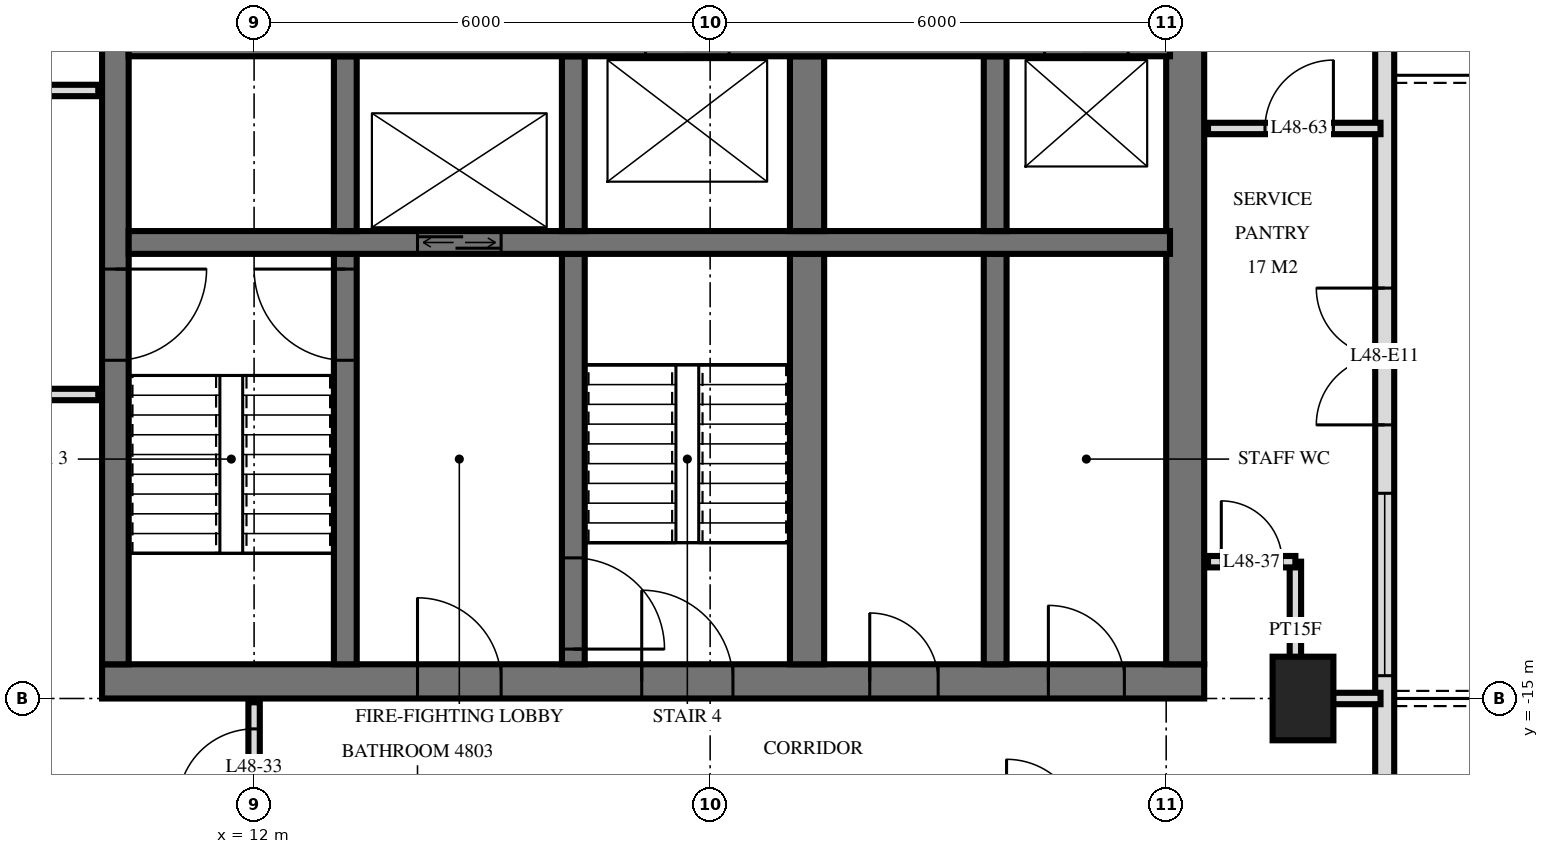
"""IFC4 building model, lengths in metres.
Left out: names, types, materials, properties, quantities, classifications, styles, units other than length and angle.
Written with IfcOpenShell. Run it as: python <this file> out.ifc"""

import sys

from ifc_helpers import new_model, si_unit, direction, frame, frame_2d, origin, origin_2d, place, context, subcontext, project, spatial, rectangle, extrude, element, fill, save


model = new_model("IFC4")
c1 = context("Model", 3, precision=1e-05, world=origin(), true_north=direction((0.0, 1.0)))
c2 = subcontext(c1, "Body", "Model", "MODEL_VIEW")
j1 = project(units=[si_unit("LENGTHUNIT", "METRE"), si_unit("PLANEANGLEUNIT", "RADIAN")], contexts=[c1])
p1 = place(None, origin())
s1 = spatial("IfcSite", under=j1, at=p1, CompositionType="ELEMENT")
p2 = place(p1, origin())
s2 = spatial("IfcBuilding", under=s1, at=p2, CompositionType="ELEMENT")
p3 = place(p2, frame((0.0, 0.0, 187.1)))
s3 = spatial("IfcBuildingStorey", under=s2, at=p3, CompositionType="ELEMENT", Elevation=187.1)
p4 = place(p3, frame((25.8, -15.0, 0.0), z_axis=(0.0, 0.0, 1.0), x_axis=(0.0, 1.0, 0.0)))
e1 = element("IfcColumn", 1, at=p4, inside=s3, PredefinedType="COLUMN", context=c2, shape_type="SweptSolid", body=[
    extrude(rectangle(XDim=1.1, YDim=0.8, at=origin_2d()), origin(), (0.0, 0.0, 1.0), 3.5),
])
p5 = place(p3, frame((10.0, -14.775, 0.0), z_axis=(0.0, 0.0, 1.0), x_axis=(1.0, 0.0, 0.0)))
e2 = element("IfcWall", 2, at=p5, inside=s3, PredefinedType="SHEAR", context=c2, shape_type="SweptSolid", body=[
    extrude(rectangle(XDim=14.5, YDim=0.45, at=frame_2d((7.25, 0.0))), origin(), (0.0, 0.0, 1.0), 3.5),
])
p6 = place(p5, frame((7.1, 0.0, 0.0)))
e3 = element("IfcOpeningElement", 3, at=p6, cuts=e2, PredefinedType="OPENING", context=c2, shape_type="SweptSolid", body=[
    extrude(rectangle(XDim=1.2, YDim=2.1, at=frame_2d((0.6, 1.05))), frame((0.0, 0.235, 0.0), z_axis=(0.0, -1.0, 0.0), x_axis=(1.0, 0.0, 0.0)), (0.0, 0.0, 1.0), 0.47),
])
p7 = place(p5, frame((4.15, 0.0, 0.0)))
e4 = element("IfcOpeningElement", 4, at=p7, cuts=e2, PredefinedType="OPENING", context=c2, shape_type="SweptSolid", body=[
    extrude(rectangle(XDim=1.1, YDim=2.1, at=frame_2d((0.55, 1.05))), frame((0.0, 0.235, 0.0), z_axis=(0.0, -1.0, 0.0), x_axis=(1.0, 0.0, 0.0)), (0.0, 0.0, 1.0), 0.47),
])
p8 = place(p5, frame((10.1, 0.0, 0.0)))
e5 = element("IfcOpeningElement", 5, at=p8, cuts=e2, PredefinedType="OPENING", context=c2, shape_type="SweptSolid", body=[
    extrude(rectangle(XDim=0.9, YDim=2.1, at=frame_2d((0.45, 1.05))), frame((0.0, 0.235, 0.0), z_axis=(0.0, -1.0, 0.0), x_axis=(1.0, 0.0, 0.0)), (0.0, 0.0, 1.0), 0.47),
])
p9 = place(p5, frame((12.45, 0.0, 0.0)))
e6 = element("IfcOpeningElement", 6, at=p9, cuts=e2, PredefinedType="OPENING", context=c2, shape_type="SweptSolid", body=[
    extrude(rectangle(XDim=1.0, YDim=2.1, at=frame_2d((0.5, 1.05))), frame((0.0, 0.235, 0.0), z_axis=(0.0, -1.0, 0.0), x_axis=(1.0, 0.0, 0.0)), (0.0, 0.0, 1.0), 0.47),
])
p10 = place(p3, frame((10.175, -14.55, 0.0), z_axis=(0.0, 0.0, 1.0), x_axis=(0.0, 1.0, 0.0)))
e7 = element("IfcWall", 7, at=p10, inside=s3, PredefinedType="SHEAR", context=c2, shape_type="SweptSolid", body=[
    extrude(rectangle(XDim=14.1, YDim=0.35, at=frame_2d((7.05, 0.0))), origin(), (0.0, 0.0, 1.0), 3.5),
])
p11 = place(p10, frame((8.4, 0.0, 0.0)))
e8 = element("IfcOpeningElement", 8, at=p11, cuts=e7, PredefinedType="OPENING", context=c2, shape_type="SweptSolid", body=[
    extrude(rectangle(XDim=1.4, YDim=2.4, at=frame_2d((0.7, 1.2))), frame((0.0, 0.185, 0.0), z_axis=(0.0, -1.0, 0.0), x_axis=(1.0, 0.0, 0.0)), (0.0, 0.0, 1.0), 0.37),
])
p12 = place(p10, frame((10.0, 0.0, 0.0)))
e9 = element("IfcOpeningElement", 9, at=p12, cuts=e7, PredefinedType="OPENING", context=c2, shape_type="SweptSolid", body=[
    extrude(rectangle(XDim=1.4, YDim=2.4, at=frame_2d((0.7, 1.2))), frame((0.0, 0.185, 0.0), z_axis=(0.0, -1.0, 0.0), x_axis=(1.0, 0.0, 0.0)), (0.0, 0.0, 1.0), 0.37),
])
p13 = place(p10, frame((4.0, 0.0, 0.0)))
e10 = element("IfcOpeningElement", 10, at=p13, cuts=e7, PredefinedType="OPENING", context=c2, shape_type="SweptSolid", body=[
    extrude(rectangle(XDim=1.2, YDim=2.1, at=frame_2d((0.6, 1.05))), frame((0.0, 0.185, 0.0), z_axis=(0.0, -1.0, 0.0), x_axis=(1.0, 0.0, 0.0)), (0.0, 0.0, 1.0), 0.37),
])
p14 = place(p3, frame((24.25, -14.55, 0.0), z_axis=(0.0, 0.0, 1.0), x_axis=(0.0, 1.0, 0.0)))
e11 = element("IfcWall", 11, at=p14, inside=s3, PredefinedType="SHEAR", context=c2, shape_type="SweptSolid", body=[
    extrude(rectangle(XDim=14.1, YDim=0.5, at=frame_2d((7.05, 0.0))), origin(), (0.0, 0.0, 1.0), 3.5),
])
p15 = place(p3, frame((10.35, -6.4, 0.0), z_axis=(0.0, 0.0, 1.0), x_axis=(1.0, 0.0, 0.0)))
e12 = element("IfcWall", 12, at=p15, inside=s3, PredefinedType="SHEAR", context=c2, shape_type="SweptSolid", body=[
    extrude(rectangle(XDim=13.7, YDim=0.3, at=frame_2d((6.85, 0.0))), origin(), (0.0, 0.0, 1.0), 3.5),
])
p16 = place(p15, frame((12.05, 0.0, 0.0)))
e13 = element("IfcOpeningElement", 13, at=p16, cuts=e12, PredefinedType="OPENING", context=c2, shape_type="SweptSolid", body=[
    extrude(rectangle(XDim=1.1, YDim=2.1, at=frame_2d((0.55, 1.05))), frame((0.0, 0.16, 0.0), z_axis=(0.0, -1.0, 0.0), x_axis=(1.0, 0.0, 0.0)), (0.0, 0.0, 1.0), 0.32),
])
p17 = place(p15, frame((6.8, 0.0, 0.0)))
e14 = element("IfcOpeningElement", 14, at=p17, cuts=e12, PredefinedType="OPENING", context=c2, shape_type="SweptSolid", body=[
    extrude(rectangle(XDim=1.1, YDim=2.1, at=frame_2d((0.55, 1.05))), frame((0.0, 0.16, 0.0), z_axis=(0.0, -1.0, 0.0), x_axis=(1.0, 0.0, 0.0)), (0.0, 0.0, 1.0), 0.32),
])
p18 = place(p3, frame((10.35, -9.0, 0.0), z_axis=(0.0, 0.0, 1.0), x_axis=(1.0, 0.0, 0.0)))
e15 = element("IfcWall", 15, at=p18, inside=s3, PredefinedType="SHEAR", context=c2, shape_type="SweptSolid", body=[
    extrude(rectangle(XDim=13.7, YDim=0.3, at=frame_2d((6.85, 0.0))), origin(), (0.0, 0.0, 1.0), 3.5),
])
p19 = place(p18, frame((3.8, 0.0, 0.0)))
e16 = element("IfcOpeningElement", 16, at=p19, cuts=e15, PredefinedType="OPENING", context=c2, shape_type="SweptSolid", body=[
    extrude(rectangle(XDim=1.1, YDim=2.1, at=frame_2d((0.55, 1.05))), frame((0.0, 0.16, 0.0), z_axis=(0.0, -1.0, 0.0), x_axis=(1.0, 0.0, 0.0)), (0.0, 0.0, 1.0), 0.32),
])
p20 = place(p3, frame((13.2, -8.85, 0.0), z_axis=(0.0, 0.0, 1.0), x_axis=(0.0, 1.0, 0.0)))
e17 = element("IfcWall", 17, at=p20, inside=s3, PredefinedType="SHEAR", context=c2, shape_type="SweptSolid", body=[
    extrude(rectangle(XDim=2.3, YDim=0.3, at=frame_2d((1.15, 0.0))), origin(), (0.0, 0.0, 1.0), 3.5),
])
p21 = place(p3, frame((13.2, -14.55, 0.0), z_axis=(0.0, 0.0, 1.0), x_axis=(0.0, 1.0, 0.0)))
e18 = element("IfcWall", 18, at=p21, inside=s3, PredefinedType="SHEAR", context=c2, shape_type="SweptSolid", body=[
    extrude(rectangle(XDim=5.4, YDim=0.3, at=frame_2d((2.7, 0.0))), origin(), (0.0, 0.0, 1.0), 3.5),
])
p22 = place(p21, frame((4.0, 0.0, 0.0)))
e19 = element("IfcOpeningElement", 19, at=p22, cuts=e18, PredefinedType="OPENING", context=c2, shape_type="SweptSolid", body=[
    extrude(rectangle(XDim=1.2, YDim=2.1, at=frame_2d((0.6, 1.05))), frame((0.0, 0.16, 0.0), z_axis=(0.0, -1.0, 0.0), x_axis=(1.0, 0.0, 0.0)), (0.0, 0.0, 1.0), 0.32),
])
p23 = place(p3, frame((16.2, -8.85, 0.0), z_axis=(0.0, 0.0, 1.0), x_axis=(0.0, 1.0, 0.0)))
e20 = element("IfcWall", 20, at=p23, inside=s3, PredefinedType="SHEAR", context=c2, shape_type="SweptSolid", body=[
    extrude(rectangle(XDim=2.3, YDim=0.3, at=frame_2d((1.15, 0.0))), origin(), (0.0, 0.0, 1.0), 3.5),
])
p24 = place(p3, frame((16.2, -14.55, 0.0), z_axis=(0.0, 0.0, 1.0), x_axis=(0.0, 1.0, 0.0)))
e21 = element("IfcWall", 21, at=p24, inside=s3, PredefinedType="SHEAR", context=c2, shape_type="SweptSolid", body=[
    extrude(rectangle(XDim=5.4, YDim=0.3, at=frame_2d((2.7, 0.0))), origin(), (0.0, 0.0, 1.0), 3.5),
])
p25 = place(p24, frame((0.2, 0.0, 0.0)))
e22 = element("IfcOpeningElement", 22, at=p25, cuts=e21, PredefinedType="OPENING", context=c2, shape_type="SweptSolid", body=[
    extrude(rectangle(XDim=1.2, YDim=2.1, at=frame_2d((0.6, 1.05))), frame((0.0, 0.16, 0.0), z_axis=(0.0, -1.0, 0.0), x_axis=(1.0, 0.0, 0.0)), (0.0, 0.0, 1.0), 0.32),
])
p26 = place(p3, frame((19.275, -8.85, 0.0), z_axis=(0.0, 0.0, 1.0), x_axis=(0.0, 1.0, 0.0)))
e23 = element("IfcWall", 23, at=p26, inside=s3, PredefinedType="SHEAR", context=c2, shape_type="SweptSolid", body=[
    extrude(rectangle(XDim=2.3, YDim=0.45, at=frame_2d((1.15, 0.0))), origin(), (0.0, 0.0, 1.0), 3.5),
])
p27 = place(p3, frame((19.275, -14.55, 0.0), z_axis=(0.0, 0.0, 1.0), x_axis=(0.0, 1.0, 0.0)))
e24 = element("IfcWall", 24, at=p27, inside=s3, PredefinedType="SHEAR", context=c2, shape_type="SweptSolid", body=[
    extrude(rectangle(XDim=5.4, YDim=0.45, at=frame_2d((2.7, 0.0))), origin(), (0.0, 0.0, 1.0), 3.5),
])
p28 = place(p3, frame((21.75, -8.85, 0.0), z_axis=(0.0, 0.0, 1.0), x_axis=(0.0, 1.0, 0.0)))
e25 = element("IfcWall", 25, at=p28, inside=s3, PredefinedType="SHEAR", context=c2, shape_type="SweptSolid", body=[
    extrude(rectangle(XDim=2.3, YDim=0.3, at=frame_2d((1.15, 0.0))), origin(), (0.0, 0.0, 1.0), 3.5),
])
p29 = place(p3, frame((21.75, -14.55, 0.0), z_axis=(0.0, 0.0, 1.0), x_axis=(0.0, 1.0, 0.0)))
e26 = element("IfcWall", 26, at=p29, inside=s3, PredefinedType="SHEAR", context=c2, shape_type="SweptSolid", body=[
    extrude(rectangle(XDim=5.4, YDim=0.3, at=frame_2d((2.7, 0.0))), origin(), (0.0, 0.0, 1.0), 3.5),
])
p30 = place(p3, frame((26.875, -24.875, 0.0), z_axis=(0.0, 0.0, 1.0), x_axis=(0.0, 1.0, 0.0)))
e27 = element("IfcWall", 27, at=p30, inside=s3, PredefinedType="SOLIDWALL", context=c2, shape_type="SweptSolid", body=[
    extrude(rectangle(XDim=21.551, YDim=0.25, at=frame_2d((10.775, 0.0))), origin(), (0.0, 0.0, 1.0), 3.22),
])
p31 = place(p30, frame((0.575, 0.0, 0.0)))
e28 = element("IfcOpeningElement", 28, at=p31, cuts=e27, PredefinedType="OPENING", context=c2, shape_type="SweptSolid", body=[
    extrude(rectangle(XDim=1.8, YDim=2.4, at=frame_2d((0.9, 1.2))), frame((0.0, 0.135, 0.0), z_axis=(0.0, -1.0, 0.0), x_axis=(1.0, 0.0, 0.0)), (0.0, 0.0, 1.0), 0.27),
])
p32 = place(p30, frame((5.675, 0.0, 0.0)))
e29 = element("IfcOpeningElement", 29, at=p32, cuts=e27, PredefinedType="OPENING", context=c2, shape_type="SweptSolid", body=[
    extrude(rectangle(XDim=1.8, YDim=2.4, at=frame_2d((0.9, 1.2))), frame((0.0, 0.135, 0.0), z_axis=(0.0, -1.0, 0.0), x_axis=(1.0, 0.0, 0.0)), (0.0, 0.0, 1.0), 0.27),
])
p33 = place(p30, frame((10.175, 0.0, 0.9)))
e30 = element("IfcOpeningElement", 30, at=p33, cuts=e27, PredefinedType="OPENING", context=c2, shape_type="SweptSolid", body=[
    extrude(rectangle(XDim=2.4, YDim=1.5, at=frame_2d((1.2, 0.75))), frame((0.0, 0.135, 0.0), z_axis=(0.0, -1.0, 0.0), x_axis=(1.0, 0.0, 0.0)), (0.0, 0.0, 1.0), 0.27),
])
p34 = place(p30, frame((13.475, 0.0, 0.0)))
e31 = element("IfcOpeningElement", 31, at=p34, cuts=e27, PredefinedType="OPENING", context=c2, shape_type="SweptSolid", body=[
    extrude(rectangle(XDim=1.8, YDim=2.4, at=frame_2d((0.9, 1.2))), frame((0.0, 0.135, 0.0), z_axis=(0.0, -1.0, 0.0), x_axis=(1.0, 0.0, 0.0)), (0.0, 0.0, 1.0), 0.27),
])
p35 = place(p3, frame((25.7, -15.0, 0.0), z_axis=(0.0, 0.0, 1.0), x_axis=(0.0, 1.0, 0.0)))
e32 = element("IfcWall", 32, at=p35, inside=s3, PredefinedType="PARTITIONING", context=c2, shape_type="SweptSolid", body=[
    extrude(rectangle(XDim=1.8, YDim=0.15, at=frame_2d((0.9, 0.0))), origin(), (0.0, 0.0, 1.0), 3.22),
])
p36 = place(p3, frame((12.0, -16.8, 0.0), z_axis=(0.0, 0.0, 1.0), x_axis=(0.0, 1.0, 0.0)))
e33 = element("IfcWall", 33, at=p36, inside=s3, PredefinedType="PARTITIONING", context=c2, shape_type="SweptSolid", body=[
    extrude(rectangle(XDim=1.75, YDim=0.15, at=frame_2d((0.875, 0.0))), origin(), (0.0, 0.0, 1.0), 3.22),
])
p37 = place(p36, frame((0.4, 0.0, 0.0)))
e34 = element("IfcOpeningElement", 34, at=p37, cuts=e33, PredefinedType="OPENING", context=c2, shape_type="SweptSolid", body=[
    extrude(rectangle(XDim=1.0, YDim=2.1, at=frame_2d((0.5, 1.05))), frame((0.0, 0.085, 0.0), z_axis=(0.0, -1.0, 0.0), x_axis=(1.0, 0.0, 0.0)), (0.0, 0.0, 1.0), 0.17),
])
p38 = place(p3, frame((25.7, -15.0, 0.0), z_axis=(0.0, 0.0, 1.0), x_axis=(1.0, 0.0, 0.0)))
e35 = element("IfcWall", 35, at=p38, inside=s3, PredefinedType="PARTITIONING", context=c2, shape_type="SweptSolid", body=[
    extrude(rectangle(XDim=1.12, YDim=0.15, at=frame_2d((0.56, 0.0))), origin(), (0.0, 0.0, 1.0), 3.22),
])
p39 = place(p3, frame((24.55, -13.2, 0.0), z_axis=(0.0, 0.0, 1.0), x_axis=(1.0, 0.0, 0.0)))
e36 = element("IfcWall", 36, at=p39, inside=s3, PredefinedType="PARTITIONING", context=c2, shape_type="SweptSolid", body=[
    extrude(rectangle(XDim=1.15, YDim=0.15, at=frame_2d((0.575, 0.0))), origin(), (0.0, 0.0, 1.0), 3.22),
])
p40 = place(p39, frame((0.175, 0.0, 0.0)))
e37 = element("IfcOpeningElement", 37, at=p40, cuts=e36, PredefinedType="OPENING", context=c2, shape_type="SweptSolid", body=[
    extrude(rectangle(XDim=0.8, YDim=2.1, at=frame_2d((0.4, 1.05))), frame((0.0, 0.085, 0.0), z_axis=(0.0, -1.0, 0.0), x_axis=(1.0, 0.0, 0.0)), (0.0, 0.0, 1.0), 0.17),
])
p41 = place(p3, frame((-9.95, -11.0, 0.0), z_axis=(0.0, 0.0, 1.0), x_axis=(1.0, 0.0, 0.0)))
e38 = element("IfcWall", 38, at=p41, inside=s3, PredefinedType="PARTITIONING", context=c2, shape_type="SweptSolid", body=[
    extrude(rectangle(XDim=19.9, YDim=0.15, at=frame_2d((9.95, 0.0))), origin(), (0.0, 0.0, 1.0), 3.22),
])
p42 = place(p41, frame((9.45, 0.0, 0.0)))
e39 = element("IfcOpeningElement", 39, at=p42, cuts=e38, PredefinedType="OPENING", context=c2, shape_type="SweptSolid", body=[
    extrude(rectangle(XDim=1.0, YDim=2.1, at=frame_2d((0.5, 1.05))), frame((0.0, 0.085, 0.0), z_axis=(0.0, -1.0, 0.0), x_axis=(1.0, 0.0, 0.0)), (0.0, 0.0, 1.0), 0.17),
])
p43 = place(p41, frame((15.45, 0.0, 0.0)))
e40 = element("IfcOpeningElement", 40, at=p43, cuts=e38, PredefinedType="OPENING", context=c2, shape_type="SweptSolid", body=[
    extrude(rectangle(XDim=1.0, YDim=2.1, at=frame_2d((0.5, 1.05))), frame((0.0, 0.085, 0.0), z_axis=(0.0, -1.0, 0.0), x_axis=(1.0, 0.0, 0.0)), (0.0, 0.0, 1.0), 0.17),
])
p44 = place(p3, frame((24.55, -7.5, 0.0), z_axis=(0.0, 0.0, 1.0), x_axis=(1.0, 0.0, 0.0)))
e41 = element("IfcWall", 41, at=p44, inside=s3, PredefinedType="PARTITIONING", context=c2, shape_type="SweptSolid", body=[
    extrude(rectangle(XDim=2.27, YDim=0.15, at=frame_2d((1.135, 0.0))), origin(), (0.0, 0.0, 1.0), 3.22),
])
p45 = place(p44, frame((0.75, 0.0, 0.0)))
e42 = element("IfcOpeningElement", 42, at=p45, cuts=e41, PredefinedType="OPENING", context=c2, shape_type="SweptSolid", body=[
    extrude(rectangle(XDim=0.9, YDim=2.1, at=frame_2d((0.45, 1.05))), frame((0.0, 0.085, 0.0), z_axis=(0.0, -1.0, 0.0), x_axis=(1.0, 0.0, 0.0)), (0.0, 0.0, 1.0), 0.17),
])
p46 = place(p3, frame((-9.95, -7.0, 0.0), z_axis=(0.0, 0.0, 1.0), x_axis=(1.0, 0.0, 0.0)))
e43 = element("IfcWall", 43, at=p46, inside=s3, PredefinedType="PARTITIONING", context=c2, shape_type="SweptSolid", body=[
    extrude(rectangle(XDim=19.9, YDim=0.15, at=frame_2d((9.95, 0.0))), origin(), (0.0, 0.0, 1.0), 3.22),
])
p47 = place(p46, frame((9.45, 0.0, 0.0)))
e44 = element("IfcOpeningElement", 44, at=p47, cuts=e43, PredefinedType="OPENING", context=c2, shape_type="SweptSolid", body=[
    extrude(rectangle(XDim=1.0, YDim=2.1, at=frame_2d((0.5, 1.05))), frame((0.0, 0.085, 0.0), z_axis=(0.0, -1.0, 0.0), x_axis=(1.0, 0.0, 0.0)), (0.0, 0.0, 1.0), 0.17),
])
p48 = place(p46, frame((3.45, 0.0, 0.0)))
e45 = element("IfcOpeningElement", 45, at=p48, cuts=e43, PredefinedType="OPENING", context=c2, shape_type="SweptSolid", body=[
    extrude(rectangle(XDim=1.0, YDim=2.1, at=frame_2d((0.5, 1.05))), frame((0.0, 0.085, 0.0), z_axis=(0.0, -1.0, 0.0), x_axis=(1.0, 0.0, 0.0)), (0.0, 0.0, 1.0), 0.17),
])
p49 = place(p33, origin())
e46 = element("IfcWindow", 46, at=p49, inside=s3, PartitioningType="SINGLE_PANEL", PredefinedType="WINDOW", context=c2, shape_type="SweptSolid", body=[
    extrude(rectangle(XDim=2.4, YDim=1.5, at=frame_2d((1.2, 0.75))), frame((0.0, 0.03, 0.0), z_axis=(0.0, -1.0, 0.0), x_axis=(1.0, 0.0, 0.0)), (0.0, 0.0, 1.0), 0.06),
])
fill(e30, e46)
p50 = place(p34, origin())
e47 = element("IfcDoor", 47, at=p50, inside=s3, OperationType="DOUBLE_DOOR_SINGLE_SWING", PredefinedType="DOOR", context=c2, shape_type="SweptSolid", body=[
    extrude(rectangle(XDim=1.8, YDim=2.4, at=frame_2d((0.9, 1.2))), frame((0.0, 0.025, 0.0), z_axis=(0.0, -1.0, 0.0), x_axis=(1.0, 0.0, 0.0)), (0.0, 0.0, 1.0), 0.05),
])
fill(e31, e47)
p51 = place(p19, origin())
e48 = element("IfcDoor", 48, at=p51, inside=s3, OperationType="DOUBLE_DOOR_SLIDING", PredefinedType="USERDEFINED", context=c2, shape_type="SweptSolid", body=[
    extrude(rectangle(XDim=1.1, YDim=2.1, at=frame_2d((0.55, 1.05))), frame((0.0, 0.025, 0.0), z_axis=(0.0, -1.0, 0.0), x_axis=(1.0, 0.0, 0.0)), (0.0, 0.0, 1.0), 0.05),
])
fill(e16, e48)
p52 = place(p13, frame((0.6, 0.0, 0.0), z_axis=(0.0, 0.0, 1.0), x_axis=(-1.0, 0.0, 0.0)))
e49 = element("IfcDoor", 49, at=p52, inside=s3, OperationType="SINGLE_SWING_RIGHT", PredefinedType="DOOR", context=c2, shape_type="SweptSolid", body=[
    extrude(rectangle(XDim=1.2, YDim=2.1, at=frame_2d((0.0, 1.05))), frame((0.0, -0.025, 0.0), z_axis=(0.0, 1.0, 0.0), x_axis=(-1.0, 0.0, 0.0)), (0.0, 0.0, 1.0), 0.05),
])
fill(e10, e49)
p53 = place(p6, origin())
e50 = element("IfcDoor", 50, at=p53, inside=s3, OperationType="SINGLE_SWING_RIGHT", PredefinedType="DOOR", context=c2, shape_type="SweptSolid", body=[
    extrude(rectangle(XDim=1.2, YDim=2.1, at=frame_2d((0.6, 1.05))), frame((0.0, 0.025, 0.0), z_axis=(0.0, -1.0, 0.0), x_axis=(1.0, 0.0, 0.0)), (0.0, 0.0, 1.0), 0.05),
])
fill(e3, e50)
p54 = place(p7, origin())
e51 = element("IfcDoor", 51, at=p54, inside=s3, OperationType="SINGLE_SWING_RIGHT", PredefinedType="DOOR", context=c2, shape_type="SweptSolid", body=[
    extrude(rectangle(XDim=1.1, YDim=2.1, at=frame_2d((0.55, 1.05))), frame((0.0, 0.025, 0.0), z_axis=(0.0, -1.0, 0.0), x_axis=(1.0, 0.0, 0.0)), (0.0, 0.0, 1.0), 0.05),
])
fill(e4, e51)
p55 = place(p8, origin())
e52 = element("IfcDoor", 52, at=p55, inside=s3, OperationType="SINGLE_SWING_RIGHT", PredefinedType="DOOR", context=c2, shape_type="SweptSolid", body=[
    extrude(rectangle(XDim=0.9, YDim=2.1, at=frame_2d((0.45, 1.05))), frame((0.0, 0.025, 0.0), z_axis=(0.0, -1.0, 0.0), x_axis=(1.0, 0.0, 0.0)), (0.0, 0.0, 1.0), 0.05),
])
fill(e5, e52)
p56 = place(p9, origin())
e53 = element("IfcDoor", 53, at=p56, inside=s3, OperationType="SINGLE_SWING_RIGHT", PredefinedType="DOOR", context=c2, shape_type="SweptSolid", body=[
    extrude(rectangle(XDim=1.0, YDim=2.1, at=frame_2d((0.5, 1.05))), frame((0.0, 0.025, 0.0), z_axis=(0.0, -1.0, 0.0), x_axis=(1.0, 0.0, 0.0)), (0.0, 0.0, 1.0), 0.05),
])
fill(e6, e53)
p57 = place(p22, origin())
e54 = element("IfcDoor", 54, at=p57, inside=s3, OperationType="SINGLE_SWING_LEFT", PredefinedType="DOOR", context=c2, shape_type="SweptSolid", body=[
    extrude(rectangle(XDim=1.2, YDim=2.1, at=frame_2d((0.6, 1.05))), frame((0.0, 0.025, 0.0), z_axis=(0.0, -1.0, 0.0), x_axis=(1.0, 0.0, 0.0)), (0.0, 0.0, 1.0), 0.05),
])
fill(e19, e54)
p58 = place(p25, frame((0.6, 0.0, 0.0), z_axis=(0.0, 0.0, 1.0), x_axis=(-1.0, 0.0, 0.0)))
e55 = element("IfcDoor", 55, at=p58, inside=s3, OperationType="SINGLE_SWING_LEFT", PredefinedType="DOOR", context=c2, shape_type="SweptSolid", body=[
    extrude(rectangle(XDim=1.2, YDim=2.1, at=frame_2d((0.0, 1.05))), frame((0.0, -0.025, 0.0), z_axis=(0.0, 1.0, 0.0), x_axis=(-1.0, 0.0, 0.0)), (0.0, 0.0, 1.0), 0.05),
])
fill(e22, e55)
p59 = place(p37, origin())
e56 = element("IfcDoor", 56, at=p59, inside=s3, OperationType="SINGLE_SWING_RIGHT", PredefinedType="DOOR", context=c2, shape_type="SweptSolid", body=[
    extrude(rectangle(XDim=1.0, YDim=2.1, at=frame_2d((0.5, 1.05))), frame((0.0, 0.025, 0.0), z_axis=(0.0, -1.0, 0.0), x_axis=(1.0, 0.0, 0.0)), (0.0, 0.0, 1.0), 0.05),
])
fill(e34, e56)
p60 = place(p40, origin())
e57 = element("IfcDoor", 57, at=p60, inside=s3, OperationType="SINGLE_SWING_RIGHT", PredefinedType="DOOR", context=c2, shape_type="SweptSolid", body=[
    extrude(rectangle(XDim=0.8, YDim=2.1, at=frame_2d((0.4, 1.05))), frame((0.0, 0.025, 0.0), z_axis=(0.0, -1.0, 0.0), x_axis=(1.0, 0.0, 0.0)), (0.0, 0.0, 1.0), 0.05),
])
fill(e37, e57)
p61 = place(p45, origin())
e58 = element("IfcDoor", 58, at=p61, inside=s3, OperationType="SINGLE_SWING_LEFT", PredefinedType="DOOR", context=c2, shape_type="SweptSolid", body=[
    extrude(rectangle(XDim=0.9, YDim=2.1, at=frame_2d((0.45, 1.05))), frame((0.0, 0.025, 0.0), z_axis=(0.0, -1.0, 0.0), x_axis=(1.0, 0.0, 0.0)), (0.0, 0.0, 1.0), 0.05),
])
fill(e42, e58)
save(model, sys.argv[1])
